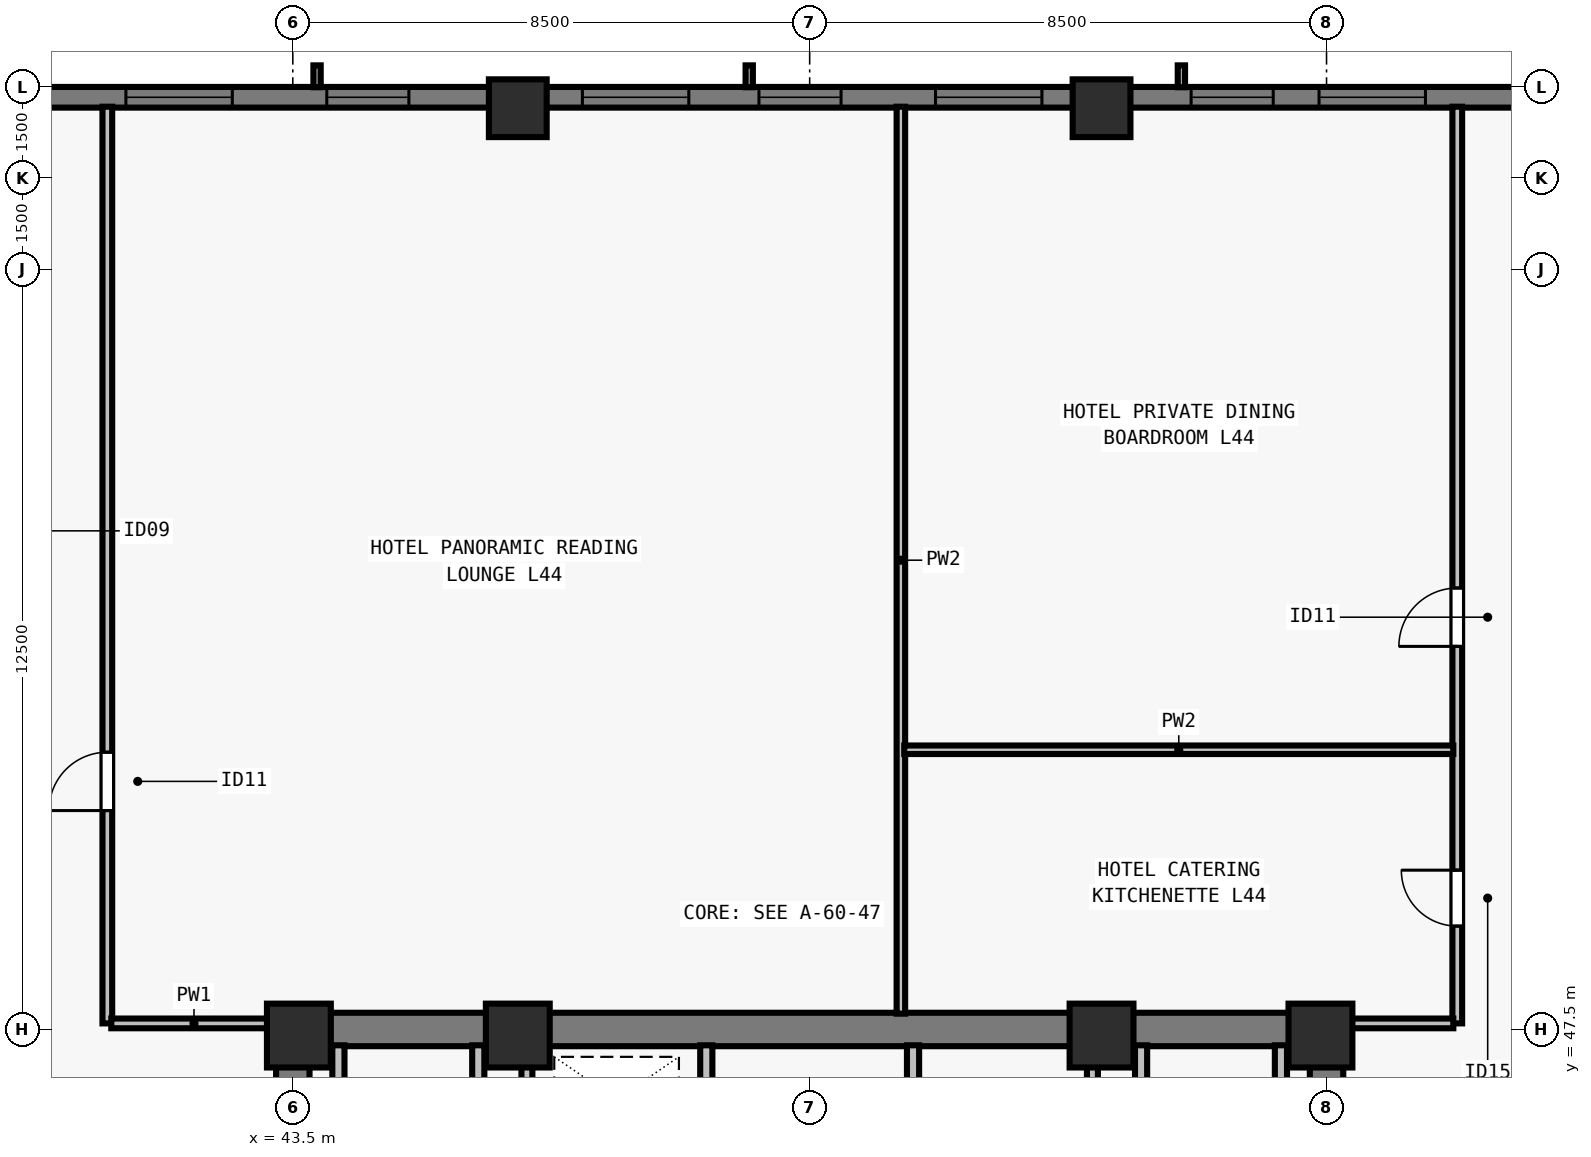
"""IFC4 building model, lengths in metres.
Left out: names, types, materials, properties, quantities, classifications, styles, units other than length and angle.
Written with IfcOpenShell. Run it as: python <this file> out.ifc"""

import sys

from ifc_helpers import new_model, si_unit, direction, frame, frame_2d, origin, origin_2d, place, context, subcontext, project, spatial, rectangle, extrude, element, fill, save


model = new_model("IFC4")
c1 = context("Model", 3, precision=1e-05, world=origin(), true_north=direction((0.0, 1.0)))
c2 = subcontext(c1, "Body", "Model", "MODEL_VIEW")
j1 = project(units=[si_unit("LENGTHUNIT", "METRE"), si_unit("PLANEANGLEUNIT", "RADIAN")], contexts=[c1])
p1 = place(None, origin())
s1 = spatial("IfcSite", under=j1, at=p1, CompositionType="ELEMENT")
p2 = place(p1, origin())
s2 = spatial("IfcBuilding", under=s1, at=p2, CompositionType="ELEMENT")
p3 = place(p2, frame((0.0, 0.0, 162.0)))
s3 = spatial("IfcBuildingStorey", under=s2, at=p3, CompositionType="ELEMENT", Elevation=162.0)
for number, where, z_axis, x_axis in (
    (1, (43.6, 47.4, 0.0), (0.0, 0.0, 1.0), (1.0, 0.0, 0.0)),
    (2, (47.2, 47.4, 0.0), (0.0, 0.0, 1.0), (1.0, 0.0, 0.0)),
    (3, (56.8, 47.4, 0.0), (0.0, 0.0, 1.0), (1.0, 0.0, 0.0)),
    (4, (60.4, 47.4, 0.0), (0.0, 0.0, 1.0), (1.0, 0.0, 0.0)),
):
    element("IfcColumn", number, at=place(p3, frame(where, z_axis=z_axis, x_axis=x_axis)), inside=s3, PredefinedType="COLUMN", context=c2, shape_type="SweptSolid", body=[
        extrude(rectangle(XDim=1.05, YDim=1.05, at=origin_2d()), origin(), (0.0, 0.0, 1.0), 3.5),
    ])
for number, where, z_axis, x_axis in (
    (5, (56.8, 62.65, 0.0), (0.0, 0.0, 1.0), (1.0, 0.0, 0.0)),
    (6, (47.2, 62.65, 0.0), (0.0, 0.0, 1.0), (1.0, 0.0, 0.0)),
):
    element("IfcColumn", number, at=place(p3, frame(where, z_axis=z_axis, x_axis=x_axis)), inside=s3, PredefinedType="COLUMN", context=c2, shape_type="SweptSolid", body=[
        extrude(rectangle(XDim=0.95, YDim=0.95, at=origin_2d()), origin(), (0.0, 0.0, 1.0), 3.5),
    ])
p4 = place(p3, frame((32.0, 62.83, 0.0), z_axis=(0.0, 0.0, 1.0), x_axis=(1.0, 0.0, 0.0)))
e7 = element("IfcWall", 7, at=p4, inside=s3, PredefinedType="SOLIDWALL", context=c2, shape_type="SweptSolid", body=[
    extrude(rectangle(XDim=39.682, YDim=0.34, at=frame_2d((19.841, 0.0))), origin(), (0.0, 0.0, 1.0), 3.28),
])
p5 = place(p4, frame((4.502, 0.0, 0.8)))
e8 = element("IfcOpeningElement", 8, at=p5, cuts=e7, PredefinedType="OPENING", context=c2, shape_type="SweptSolid", body=[
    extrude(rectangle(XDim=1.35, YDim=1.66, at=frame_2d((0.675, 0.83))), frame((0.0, 0.18, 0.0), z_axis=(0.0, -1.0, 0.0), x_axis=(1.0, 0.0, 0.0)), (0.0, 0.0, 1.0), 0.36),
])
p6 = place(p4, frame((8.755, 0.0, 0.8)))
e9 = element("IfcOpeningElement", 9, at=p6, cuts=e7, PredefinedType="OPENING", context=c2, shape_type="SweptSolid", body=[
    extrude(rectangle(XDim=1.75, YDim=1.66, at=frame_2d((0.875, 0.83))), frame((0.0, 0.18, 0.0), z_axis=(0.0, -1.0, 0.0), x_axis=(1.0, 0.0, 0.0)), (0.0, 0.0, 1.0), 0.36),
])
p7 = place(p4, frame((12.059, 0.0, 0.8)))
e10 = element("IfcOpeningElement", 10, at=p7, cuts=e7, PredefinedType="OPENING", context=c2, shape_type="SweptSolid", body=[
    extrude(rectangle(XDim=1.35, YDim=1.66, at=frame_2d((0.675, 0.83))), frame((0.0, 0.18, 0.0), z_axis=(0.0, -1.0, 0.0), x_axis=(1.0, 0.0, 0.0)), (0.0, 0.0, 1.0), 0.36),
])
p8 = place(p4, frame((16.262, 0.0, 0.8)))
e11 = element("IfcOpeningElement", 11, at=p8, cuts=e7, PredefinedType="OPENING", context=c2, shape_type="SweptSolid", body=[
    extrude(rectangle(XDim=1.75, YDim=1.66, at=frame_2d((0.875, 0.83))), frame((0.0, 0.18, 0.0), z_axis=(0.0, -1.0, 0.0), x_axis=(1.0, 0.0, 0.0)), (0.0, 0.0, 1.0), 0.36),
])
p9 = place(p4, frame((19.166, 0.0, 0.8)))
e12 = element("IfcOpeningElement", 12, at=p9, cuts=e7, PredefinedType="OPENING", context=c2, shape_type="SweptSolid", body=[
    extrude(rectangle(XDim=1.35, YDim=1.66, at=frame_2d((0.675, 0.83))), frame((0.0, 0.18, 0.0), z_axis=(0.0, -1.0, 0.0), x_axis=(1.0, 0.0, 0.0)), (0.0, 0.0, 1.0), 0.36),
])
p10 = place(p4, frame((22.07, 0.0, 0.8)))
e13 = element("IfcOpeningElement", 13, at=p10, cuts=e7, PredefinedType="OPENING", context=c2, shape_type="SweptSolid", body=[
    extrude(rectangle(XDim=1.75, YDim=1.66, at=frame_2d((0.875, 0.83))), frame((0.0, 0.18, 0.0), z_axis=(0.0, -1.0, 0.0), x_axis=(1.0, 0.0, 0.0)), (0.0, 0.0, 1.0), 0.36),
])
p11 = place(p4, frame((26.273, 0.0, 0.8)))
e14 = element("IfcOpeningElement", 14, at=p11, cuts=e7, PredefinedType="OPENING", context=c2, shape_type="SweptSolid", body=[
    extrude(rectangle(XDim=1.35, YDim=1.66, at=frame_2d((0.675, 0.83))), frame((0.0, 0.18, 0.0), z_axis=(0.0, -1.0, 0.0), x_axis=(1.0, 0.0, 0.0)), (0.0, 0.0, 1.0), 0.36),
])
p12 = place(p4, frame((28.377, 0.0, 0.8)))
e15 = element("IfcOpeningElement", 15, at=p12, cuts=e7, PredefinedType="OPENING", context=c2, shape_type="SweptSolid", body=[
    extrude(rectangle(XDim=1.75, YDim=1.66, at=frame_2d((0.875, 0.83))), frame((0.0, 0.18, 0.0), z_axis=(0.0, -1.0, 0.0), x_axis=(1.0, 0.0, 0.0)), (0.0, 0.0, 1.0), 0.36),
])
p13 = place(p4, frame((33.38, 0.0, 0.8)))
e16 = element("IfcOpeningElement", 16, at=p13, cuts=e7, PredefinedType="OPENING", context=c2, shape_type="SweptSolid", body=[
    extrude(rectangle(XDim=1.35, YDim=1.66, at=frame_2d((0.675, 0.83))), frame((0.0, 0.18, 0.0), z_axis=(0.0, -1.0, 0.0), x_axis=(1.0, 0.0, 0.0)), (0.0, 0.0, 1.0), 0.36),
])
p14 = place(p3, frame((43.225, 47.5, 0.0), z_axis=(0.0, 0.0, 1.0), x_axis=(1.0, 0.0, 0.0)))
e17 = element("IfcWall", 17, at=p14, inside=s3, PredefinedType="SHEAR", context=c2, shape_type="SweptSolid", body=[
    extrude(rectangle(XDim=17.55, YDim=0.55, at=frame_2d((8.775, 0.0))), origin(), (0.0, 0.0, 1.0), 3.28),
])
for number, where, z_axis, x_axis in (
    (18, (43.5, 40.8, 0.0), (0.0, 0.0, 1.0), (0.0, 1.0, 0.0)),
    (19, (60.5, 40.8, 0.0), (0.0, 0.0, 1.0), (0.0, 1.0, 0.0)),
):
    element("IfcWall", number, at=place(p3, frame(where, z_axis=z_axis, x_axis=x_axis)), inside=s3, PredefinedType="SHEAR", context=c2, shape_type="SweptSolid", body=[
        extrude(rectangle(XDim=6.435, YDim=0.55, at=frame_2d((3.218, 0.0))), origin(), (0.0, 0.0, 1.0), 3.28),
    ])
p15 = place(p3, frame((50.3, 40.585, 0.0), z_axis=(0.0, 0.0, 1.0), x_axis=(0.0, 1.0, 0.0)))
e20 = element("IfcWall", 20, at=p15, inside=s3, PredefinedType="SOLIDWALL", context=c2, shape_type="SweptSolid", body=[
    extrude(rectangle(XDim=6.655, YDim=0.2, at=frame_2d((3.328, 0.0))), origin(), (0.0, 0.0, 1.0), 3.28),
])
p16 = place(p15, frame((5.065, 0.0, 0.0)))
e21 = element("IfcOpeningElement", 21, at=p16, cuts=e20, PredefinedType="OPENING", context=c2, shape_type="SweptSolid", body=[
    extrude(rectangle(XDim=0.8, YDim=2.08, at=frame_2d((0.4, 1.04))), frame((0.0, 0.11, 0.0), z_axis=(0.0, -1.0, 0.0), x_axis=(1.0, 0.0, 0.0)), (0.0, 0.0, 1.0), 0.22),
])
p17 = place(p3, frame((53.7, 40.585, 0.0), z_axis=(0.0, 0.0, 1.0), x_axis=(0.0, 1.0, 0.0)))
e22 = element("IfcWall", 22, at=p17, inside=s3, PredefinedType="SOLIDWALL", context=c2, shape_type="SweptSolid", body=[
    extrude(rectangle(XDim=6.655, YDim=0.2, at=frame_2d((3.328, 0.0))), origin(), (0.0, 0.0, 1.0), 3.28),
])
p18 = place(p17, frame((0.195, 0.0, 0.0)))
e23 = element("IfcOpeningElement", 23, at=p18, cuts=e22, PredefinedType="OPENING", context=c2, shape_type="SweptSolid", body=[
    extrude(rectangle(XDim=0.8, YDim=2.08, at=frame_2d((0.4, 1.04))), frame((0.0, 0.11, 0.0), z_axis=(0.0, -1.0, 0.0), x_axis=(1.0, 0.0, 0.0)), (0.0, 0.0, 1.0), 0.22),
])
p19 = place(p17, frame((4.265, 0.0, 0.0)))
e24 = element("IfcOpeningElement", 24, at=p19, cuts=e22, PredefinedType="OPENING", context=c2, shape_type="SweptSolid", body=[
    extrude(rectangle(XDim=0.95, YDim=2.12, at=frame_2d((0.475, 1.06))), frame((0.0, 0.11, 0.0), z_axis=(0.0, -1.0, 0.0), x_axis=(1.0, 0.0, 0.0)), (0.0, 0.0, 1.0), 0.22),
])
for number, where, z_axis, x_axis in (
    (25, (46.55, 43.735, 0.0), (0.0, 0.0, 1.0), (0.0, 1.0, 0.0)),
    (26, (44.25, 43.735, 0.0), (0.0, 0.0, 1.0), (0.0, 1.0, 0.0)),
    (27, (57.45, 43.735, 0.0), (0.0, 0.0, 1.0), (0.0, 1.0, 0.0)),
    (28, (59.75, 43.735, 0.0), (0.0, 0.0, 1.0), (0.0, 1.0, 0.0)),
):
    element("IfcWall", number, at=place(p3, frame(where, z_axis=z_axis, x_axis=x_axis)), inside=s3, PredefinedType="SOLIDWALL", context=c2, shape_type="SweptSolid", body=[
        extrude(rectangle(XDim=3.505, YDim=0.2, at=frame_2d((1.752, 0.0))), origin(), (0.0, 0.0, 1.0), 3.28),
    ])
for number, where, z_axis, x_axis in (
    (29, (47.35, 43.735, 0.0), (0.0, 0.0, 1.0), (0.0, 1.0, 0.0)),
    (30, (56.65, 43.735, 0.0), (0.0, 0.0, 1.0), (0.0, 1.0, 0.0)),
):
    element("IfcWall", number, at=place(p3, frame(where, z_axis=z_axis, x_axis=x_axis)), inside=s3, PredefinedType="SOLIDWALL", context=c2, shape_type="SweptSolid", body=[
        extrude(rectangle(XDim=3.505, YDim=0.18, at=frame_2d((1.752, 0.0))), origin(), (0.0, 0.0, 1.0), 3.28),
    ])
p20 = place(p3, frame((40.45, 47.6, 0.0), z_axis=(0.0, 0.0, 1.0), x_axis=(0.0, 1.0, 0.0)))
e31 = element("IfcWall", 31, at=p20, inside=s3, PredefinedType="PARTITIONING", context=c2, shape_type="SweptSolid", body=[
    extrude(rectangle(XDim=15.075, YDim=0.16, at=frame_2d((7.538, 0.0))), origin(), (0.0, 0.0, 1.0), 2.555),
])
p21 = place(p20, frame((3.5, 0.0, 0.0)))
e32 = element("IfcOpeningElement", 32, at=p21, cuts=e31, PredefinedType="OPENING", context=c2, shape_type="SweptSolid", body=[
    extrude(rectangle(XDim=0.96, YDim=2.12, at=frame_2d((0.48, 1.06))), frame((0.0, 0.09, 0.0), z_axis=(0.0, -1.0, 0.0), x_axis=(1.0, 0.0, 0.0)), (0.0, 0.0, 1.0), 0.18),
])
p22 = place(p3, frame((40.515, 47.6, 0.0), z_axis=(0.0, 0.0, 1.0), x_axis=(1.0, 0.0, 0.0)))
e33 = element("IfcWall", 33, at=p22, inside=s3, PredefinedType="PARTITIONING", context=c2, shape_type="SweptSolid", body=[
    extrude(rectangle(XDim=2.72, YDim=0.16, at=frame_2d((1.36, 0.0))), origin(), (0.0, 0.0, 1.0), 3.28),
])
p23 = place(p3, frame((62.65, 47.6, 0.0), z_axis=(0.0, 0.0, 1.0), x_axis=(0.0, 1.0, 0.0)))
e34 = element("IfcWall", 34, at=p23, inside=s3, PredefinedType="PARTITIONING", context=c2, shape_type="SweptSolid", body=[
    extrude(rectangle(XDim=15.075, YDim=0.16, at=frame_2d((7.538, 0.0))), origin(), (0.0, 0.0, 1.0), 2.555),
])
p24 = place(p23, frame((1.6, 0.0, 0.0)))
e35 = element("IfcOpeningElement", 35, at=p24, cuts=e34, PredefinedType="OPENING", context=c2, shape_type="SweptSolid", body=[
    extrude(rectangle(XDim=0.92, YDim=2.12, at=frame_2d((0.46, 1.06))), frame((0.0, 0.09, 0.0), z_axis=(0.0, -1.0, 0.0), x_axis=(1.0, 0.0, 0.0)), (0.0, 0.0, 1.0), 0.18),
])
p25 = place(p23, frame((6.2, 0.0, 0.0)))
e36 = element("IfcOpeningElement", 36, at=p25, cuts=e34, PredefinedType="OPENING", context=c2, shape_type="SweptSolid", body=[
    extrude(rectangle(XDim=0.96, YDim=2.12, at=frame_2d((0.48, 1.06))), frame((0.0, 0.09, 0.0), z_axis=(0.0, -1.0, 0.0), x_axis=(1.0, 0.0, 0.0)), (0.0, 0.0, 1.0), 0.18),
])
p26 = place(p3, frame((60.765, 47.6, 0.0), z_axis=(0.0, 0.0, 1.0), x_axis=(1.0, 0.0, 0.0)))
e37 = element("IfcWall", 37, at=p26, inside=s3, PredefinedType="PARTITIONING", context=c2, shape_type="SweptSolid", body=[
    extrude(rectangle(XDim=1.82, YDim=0.16, at=frame_2d((0.91, 0.0))), origin(), (0.0, 0.0, 1.0), 3.28),
])
p27 = place(p3, frame((53.5, 47.76, 0.0), z_axis=(0.0, 0.0, 1.0), x_axis=(0.0, 1.0, 0.0)))
e38 = element("IfcWall", 38, at=p27, inside=s3, PredefinedType="PARTITIONING", context=c2, shape_type="SweptSolid", body=[
    extrude(rectangle(XDim=14.915, YDim=0.14, at=frame_2d((7.458, 0.0))), origin(), (0.0, 0.0, 1.0), 2.896),
])
p28 = place(p3, frame((53.555, 52.1, 0.0), z_axis=(0.0, 0.0, 1.0), x_axis=(1.0, 0.0, 0.0)))
e39 = element("IfcWall", 39, at=p28, inside=s3, PredefinedType="PARTITIONING", context=c2, shape_type="SweptSolid", body=[
    extrude(rectangle(XDim=9.03, YDim=0.14, at=frame_2d((4.515, 0.0))), origin(), (0.0, 0.0, 1.0), 3.28),
])
p29 = place(p6, origin())
e40 = element("IfcWindow", 40, at=p29, inside=s3, PartitioningType="SINGLE_PANEL", PredefinedType="WINDOW", context=c2, shape_type="SweptSolid", body=[
    extrude(rectangle(XDim=1.75, YDim=1.66, at=frame_2d((0.875, 0.83))), frame((0.0, -0.05, 0.0), z_axis=(0.0, -1.0, 0.0), x_axis=(1.0, 0.0, 0.0)), (0.0, 0.0, 1.0), 0.06),
])
fill(e9, e40)
p30 = place(p7, origin())
e41 = element("IfcWindow", 41, at=p30, inside=s3, PartitioningType="SINGLE_PANEL", PredefinedType="WINDOW", context=c2, shape_type="SweptSolid", body=[
    extrude(rectangle(XDim=1.35, YDim=1.66, at=frame_2d((0.675, 0.83))), frame((0.0, -0.05, 0.0), z_axis=(0.0, -1.0, 0.0), x_axis=(1.0, 0.0, 0.0)), (0.0, 0.0, 1.0), 0.06),
])
fill(e10, e41)
p31 = place(p8, origin())
e42 = element("IfcWindow", 42, at=p31, inside=s3, PartitioningType="SINGLE_PANEL", PredefinedType="WINDOW", context=c2, shape_type="SweptSolid", body=[
    extrude(rectangle(XDim=1.75, YDim=1.66, at=frame_2d((0.875, 0.83))), frame((0.0, -0.05, 0.0), z_axis=(0.0, -1.0, 0.0), x_axis=(1.0, 0.0, 0.0)), (0.0, 0.0, 1.0), 0.06),
])
fill(e11, e42)
p32 = place(p9, origin())
e43 = element("IfcWindow", 43, at=p32, inside=s3, PartitioningType="SINGLE_PANEL", PredefinedType="WINDOW", context=c2, shape_type="SweptSolid", body=[
    extrude(rectangle(XDim=1.35, YDim=1.66, at=frame_2d((0.675, 0.83))), frame((0.0, -0.05, 0.0), z_axis=(0.0, -1.0, 0.0), x_axis=(1.0, 0.0, 0.0)), (0.0, 0.0, 1.0), 0.06),
])
fill(e12, e43)
p33 = place(p10, origin())
e44 = element("IfcWindow", 44, at=p33, inside=s3, PartitioningType="SINGLE_PANEL", PredefinedType="WINDOW", context=c2, shape_type="SweptSolid", body=[
    extrude(rectangle(XDim=1.75, YDim=1.66, at=frame_2d((0.875, 0.83))), frame((0.0, -0.05, 0.0), z_axis=(0.0, -1.0, 0.0), x_axis=(1.0, 0.0, 0.0)), (0.0, 0.0, 1.0), 0.06),
])
fill(e13, e44)
p34 = place(p11, origin())
e45 = element("IfcWindow", 45, at=p34, inside=s3, PartitioningType="SINGLE_PANEL", PredefinedType="WINDOW", context=c2, shape_type="SweptSolid", body=[
    extrude(rectangle(XDim=1.35, YDim=1.66, at=frame_2d((0.675, 0.83))), frame((0.0, -0.05, 0.0), z_axis=(0.0, -1.0, 0.0), x_axis=(1.0, 0.0, 0.0)), (0.0, 0.0, 1.0), 0.06),
])
fill(e14, e45)
p35 = place(p12, origin())
e46 = element("IfcWindow", 46, at=p35, inside=s3, PartitioningType="SINGLE_PANEL", PredefinedType="WINDOW", context=c2, shape_type="SweptSolid", body=[
    extrude(rectangle(XDim=1.75, YDim=1.66, at=frame_2d((0.875, 0.83))), frame((0.0, -0.05, 0.0), z_axis=(0.0, -1.0, 0.0), x_axis=(1.0, 0.0, 0.0)), (0.0, 0.0, 1.0), 0.06),
])
fill(e15, e46)
p36 = place(p21, origin())
e47 = element("IfcDoor", 47, at=p36, inside=s3, OperationType="SINGLE_SWING_LEFT", PredefinedType="DOOR", context=c2, shape_type="SweptSolid", body=[
    extrude(rectangle(XDim=0.96, YDim=2.12, at=frame_2d((0.48, 1.06))), frame((0.0, 0.025, 0.0), z_axis=(0.0, -1.0, 0.0), x_axis=(1.0, 0.0, 0.0)), (0.0, 0.0, 1.0), 0.05),
])
fill(e32, e47)
p37 = place(p24, origin())
e48 = element("IfcDoor", 48, at=p37, inside=s3, OperationType="SINGLE_SWING_RIGHT", PredefinedType="DOOR", context=c2, shape_type="SweptSolid", body=[
    extrude(rectangle(XDim=0.92, YDim=2.12, at=frame_2d((0.46, 1.06))), frame((0.0, 0.025, 0.0), z_axis=(0.0, -1.0, 0.0), x_axis=(1.0, 0.0, 0.0)), (0.0, 0.0, 1.0), 0.05),
])
fill(e35, e48)
p38 = place(p25, origin())
e49 = element("IfcDoor", 49, at=p38, inside=s3, OperationType="SINGLE_SWING_LEFT", PredefinedType="DOOR", context=c2, shape_type="SweptSolid", body=[
    extrude(rectangle(XDim=0.96, YDim=2.12, at=frame_2d((0.48, 1.06))), frame((0.0, 0.025, 0.0), z_axis=(0.0, -1.0, 0.0), x_axis=(1.0, 0.0, 0.0)), (0.0, 0.0, 1.0), 0.05),
])
fill(e36, e49)
save(model, sys.argv[1])
